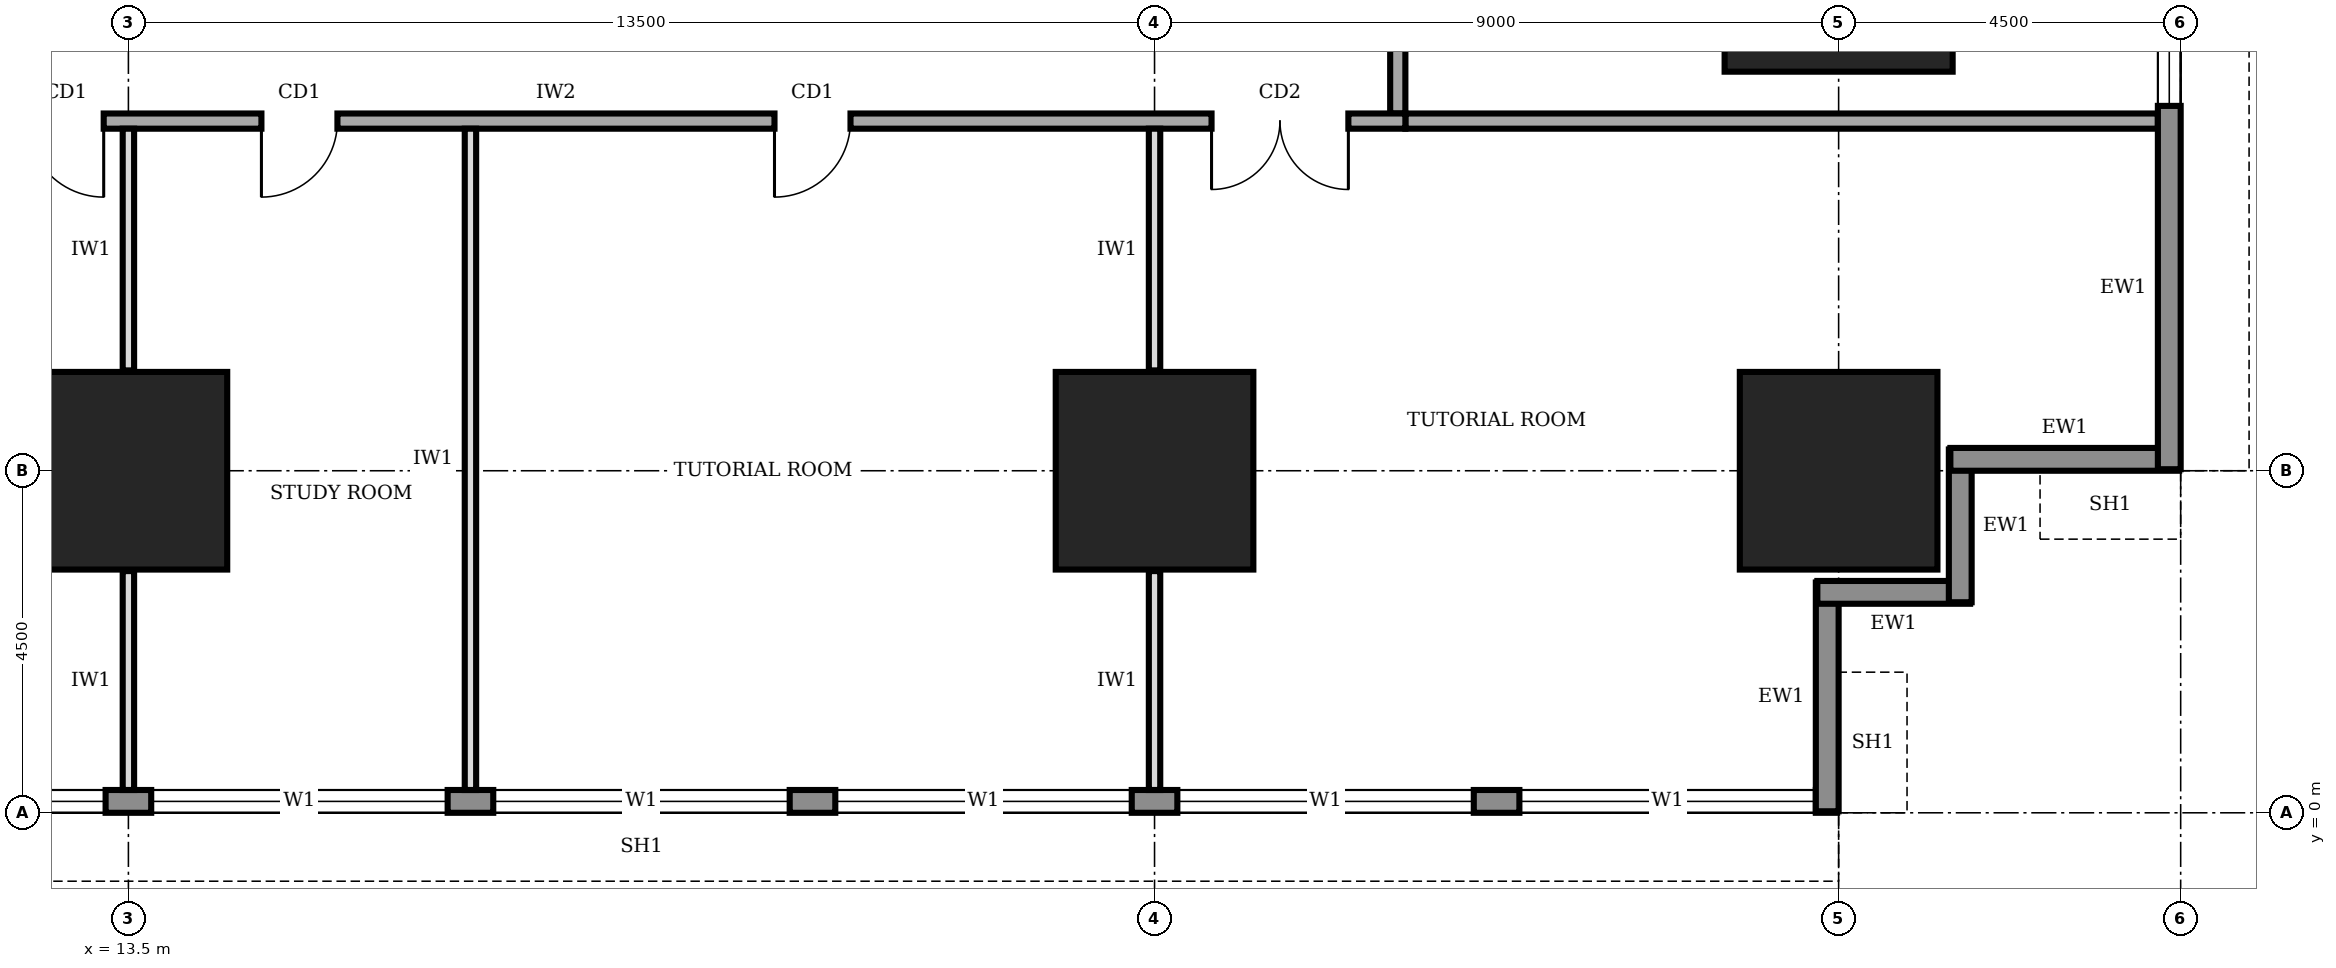
"""IFC4 building model, lengths in metres.
Left out: names, types, materials, properties, quantities, classifications, styles, units other than length and angle.
Written with IfcOpenShell. Run it as: python <this file> out.ifc"""

import sys

from ifc_helpers import new_model, si_unit, direction, frame, frame_2d, origin, origin_2d, place, context, subcontext, project, spatial, rectangle, extrude, element, fill, save


model = new_model("IFC4")
c1 = context("Model", 3, precision=1e-05, world=origin(), true_north=direction((0.0, 1.0)))
c2 = subcontext(c1, "Body", "Model", "MODEL_VIEW")
j1 = project(units=[si_unit("LENGTHUNIT", "METRE"), si_unit("PLANEANGLEUNIT", "RADIAN")], contexts=[c1])
p1 = place(None, origin())
s1 = spatial("IfcSite", under=j1, at=p1, CompositionType="ELEMENT")
p2 = place(p1, origin())
s2 = spatial("IfcBuilding", under=s1, at=p2, CompositionType="ELEMENT")
p3 = place(p2, frame((0.0, 0.0, 37.0)))
s3 = spatial("IfcBuildingStorey", under=s2, at=p3, CompositionType="ELEMENT", Elevation=37.0)
for number, where, z_axis, x_axis in (
    (1, (13.5, 4.5, 0.0), (0.0, 0.0, 1.0), (1.0, 0.0, 0.0)),
    (2, (27.0, 4.5, 0.0), (0.0, 0.0, 1.0), (1.0, 0.0, 0.0)),
    (3, (36.0, 4.5, 0.0), (0.0, 0.0, 1.0), (1.0, 0.0, 0.0)),
):
    element("IfcColumn", number, at=place(p3, frame(where, z_axis=z_axis, x_axis=x_axis)), inside=s3, PredefinedType="COLUMN", context=c2, shape_type="SweptSolid", body=[
        extrude(rectangle(XDim=2.6, YDim=2.6, at=origin_2d()), origin(), (0.0, 0.0, 1.0), 4.0),
    ])
p4 = place(p3, frame((36.0, 11.25, 0.0), z_axis=(0.0, 0.0, 1.0), x_axis=(1.0, 0.0, 0.0)))
e4 = element("IfcColumn", 4, at=p4, inside=s3, PredefinedType="COLUMN", context=c2, shape_type="SweptSolid", body=[
    extrude(rectangle(XDim=3.0, YDim=3.0, at=origin_2d()), origin(), (0.0, 0.0, 1.0), 4.0),
])
p5 = place(p3, frame((4.52, 0.15, 0.0), z_axis=(0.0, 0.0, 1.0), x_axis=(1.0, 0.0, 0.0)))
e5 = element("IfcWall", 5, at=p5, inside=s3, PredefinedType="STANDARD", context=c2, shape_type="SweptSolid", body=[
    extrude(rectangle(XDim=31.46, YDim=0.3, at=frame_2d((15.73, 0.0))), origin(), (0.0, 0.0, 1.0), 3.75),
])
p6 = place(p5, frame((4.78, 0.0, 0.9)))
e6 = element("IfcOpeningElement", 6, at=p6, cuts=e5, PredefinedType="OPENING", context=c2, shape_type="SweptSolid", body=[
    extrude(rectangle(XDim=3.9, YDim=2.2, at=frame_2d((1.95, 1.1))), frame((0.0, 0.16, 0.0), z_axis=(0.0, -1.0, 0.0), x_axis=(1.0, 0.0, 0.0)), (0.0, 0.0, 1.0), 0.32),
])
p7 = place(p5, frame((9.28, 0.0, 0.9)))
e7 = element("IfcOpeningElement", 7, at=p7, cuts=e5, PredefinedType="OPENING", context=c2, shape_type="SweptSolid", body=[
    extrude(rectangle(XDim=3.9, YDim=2.2, at=frame_2d((1.95, 1.1))), frame((0.0, 0.16, 0.0), z_axis=(0.0, -1.0, 0.0), x_axis=(1.0, 0.0, 0.0)), (0.0, 0.0, 1.0), 0.32),
])
p8 = place(p5, frame((13.78, 0.0, 0.9)))
e8 = element("IfcOpeningElement", 8, at=p8, cuts=e5, PredefinedType="OPENING", context=c2, shape_type="SweptSolid", body=[
    extrude(rectangle(XDim=3.9, YDim=2.2, at=frame_2d((1.95, 1.1))), frame((0.0, 0.16, 0.0), z_axis=(0.0, -1.0, 0.0), x_axis=(1.0, 0.0, 0.0)), (0.0, 0.0, 1.0), 0.32),
])
p9 = place(p5, frame((18.28, 0.0, 0.9)))
e9 = element("IfcOpeningElement", 9, at=p9, cuts=e5, PredefinedType="OPENING", context=c2, shape_type="SweptSolid", body=[
    extrude(rectangle(XDim=3.9, YDim=2.2, at=frame_2d((1.95, 1.1))), frame((0.0, 0.16, 0.0), z_axis=(0.0, -1.0, 0.0), x_axis=(1.0, 0.0, 0.0)), (0.0, 0.0, 1.0), 0.32),
])
p10 = place(p5, frame((22.78, 0.0, 0.9)))
e10 = element("IfcOpeningElement", 10, at=p10, cuts=e5, PredefinedType="OPENING", context=c2, shape_type="SweptSolid", body=[
    extrude(rectangle(XDim=3.9, YDim=2.2, at=frame_2d((1.95, 1.1))), frame((0.0, 0.16, 0.0), z_axis=(0.0, -1.0, 0.0), x_axis=(1.0, 0.0, 0.0)), (0.0, 0.0, 1.0), 0.32),
])
p11 = place(p5, frame((27.28, 0.0, 0.9)))
e11 = element("IfcOpeningElement", 11, at=p11, cuts=e5, PredefinedType="OPENING", context=c2, shape_type="SweptSolid", body=[
    extrude(rectangle(XDim=3.9, YDim=2.2, at=frame_2d((1.95, 1.1))), frame((0.0, 0.16, 0.0), z_axis=(0.0, -1.0, 0.0), x_axis=(1.0, 0.0, 0.0)), (0.0, 0.0, 1.0), 0.32),
])
p12 = place(p3, frame((35.85, 0.02, 0.0), z_axis=(0.0, 0.0, 1.0), x_axis=(0.0, 1.0, 0.0)))
e12 = element("IfcWall", 12, at=p12, inside=s3, PredefinedType="STANDARD", context=c2, shape_type="SweptSolid", body=[
    extrude(rectangle(XDim=3.01, YDim=0.3, at=frame_2d((1.505, 0.0))), origin(), (0.0, 0.0, 1.0), 2.85),
])
for number, where, z_axis, x_axis in (
    (13, (35.72, 2.9, 0.0), (0.0, 0.0, 1.0), (1.0, 0.0, 0.0)),
    (14, (37.6, 2.77, 0.0), (0.0, 0.0, 1.0), (0.0, 1.0, 0.0)),
):
    element("IfcWall", number, at=place(p3, frame(where, z_axis=z_axis, x_axis=x_axis)), inside=s3, PredefinedType="STANDARD", context=c2, shape_type="SweptSolid", body=[
        extrude(rectangle(XDim=2.01, YDim=0.3, at=frame_2d((1.005, 0.0))), origin(), (0.0, 0.0, 1.0), 3.75),
    ])
p13 = place(p3, frame((37.47, 4.65, 0.0), z_axis=(0.0, 0.0, 1.0), x_axis=(1.0, 0.0, 0.0)))
e15 = element("IfcWall", 15, at=p13, inside=s3, PredefinedType="STANDARD", context=c2, shape_type="SweptSolid", body=[
    extrude(rectangle(XDim=3.01, YDim=0.3, at=frame_2d((1.505, 0.0))), origin(), (0.0, 0.0, 1.0), 2.85),
])
p14 = place(p3, frame((40.35, 4.52, 0.0), z_axis=(0.0, 0.0, 1.0), x_axis=(0.0, 1.0, 0.0)))
e16 = element("IfcWall", 16, at=p14, inside=s3, PredefinedType="STANDARD", context=c2, shape_type="SweptSolid", body=[
    extrude(rectangle(XDim=31.46, YDim=0.3, at=frame_2d((15.73, 0.0))), origin(), (0.0, 0.0, 1.0), 3.75),
])
p15 = place(p14, frame((4.78, 0.0, 0.9)))
e17 = element("IfcOpeningElement", 17, at=p15, cuts=e16, PredefinedType="OPENING", context=c2, shape_type="SweptSolid", body=[
    extrude(rectangle(XDim=3.9, YDim=2.2, at=frame_2d((1.95, 1.1))), frame((0.0, 0.16, 0.0), z_axis=(0.0, -1.0, 0.0), x_axis=(1.0, 0.0, 0.0)), (0.0, 0.0, 1.0), 0.32),
])
p16 = place(p14, frame((9.28, 0.0, 0.9)))
e18 = element("IfcOpeningElement", 18, at=p16, cuts=e16, PredefinedType="OPENING", context=c2, shape_type="SweptSolid", body=[
    extrude(rectangle(XDim=3.9, YDim=2.2, at=frame_2d((1.95, 1.1))), frame((0.0, 0.16, 0.0), z_axis=(0.0, -1.0, 0.0), x_axis=(1.0, 0.0, 0.0)), (0.0, 0.0, 1.0), 0.32),
])
p17 = place(p14, frame((13.78, 0.0, 0.9)))
e19 = element("IfcOpeningElement", 19, at=p17, cuts=e16, PredefinedType="OPENING", context=c2, shape_type="SweptSolid", body=[
    extrude(rectangle(XDim=3.9, YDim=2.2, at=frame_2d((1.95, 1.1))), frame((0.0, 0.16, 0.0), z_axis=(0.0, -1.0, 0.0), x_axis=(1.0, 0.0, 0.0)), (0.0, 0.0, 1.0), 0.32),
])
p18 = place(p14, frame((18.28, 0.0, 0.9)))
e20 = element("IfcOpeningElement", 20, at=p18, cuts=e16, PredefinedType="OPENING", context=c2, shape_type="SweptSolid", body=[
    extrude(rectangle(XDim=3.9, YDim=2.2, at=frame_2d((1.95, 1.1))), frame((0.0, 0.16, 0.0), z_axis=(0.0, -1.0, 0.0), x_axis=(1.0, 0.0, 0.0)), (0.0, 0.0, 1.0), 0.32),
])
p19 = place(p14, frame((22.78, 0.0, 0.9)))
e21 = element("IfcOpeningElement", 21, at=p19, cuts=e16, PredefinedType="OPENING", context=c2, shape_type="SweptSolid", body=[
    extrude(rectangle(XDim=3.9, YDim=2.2, at=frame_2d((1.95, 1.1))), frame((0.0, 0.16, 0.0), z_axis=(0.0, -1.0, 0.0), x_axis=(1.0, 0.0, 0.0)), (0.0, 0.0, 1.0), 0.32),
])
p20 = place(p14, frame((27.28, 0.0, 0.9)))
e22 = element("IfcOpeningElement", 22, at=p20, cuts=e16, PredefinedType="OPENING", context=c2, shape_type="SweptSolid", body=[
    extrude(rectangle(XDim=3.9, YDim=2.2, at=frame_2d((1.95, 1.1))), frame((0.0, 0.16, 0.0), z_axis=(0.0, -1.0, 0.0), x_axis=(1.0, 0.0, 0.0)), (0.0, 0.0, 1.0), 0.32),
])
p21 = place(p3, frame((11.9, 9.1, 0.0), z_axis=(0.0, 0.0, 1.0), x_axis=(1.0, 0.0, 0.0)))
e23 = element("IfcWall", 23, at=p21, inside=s3, PredefinedType="SOLIDWALL", context=c2, shape_type="SweptSolid", body=[
    extrude(rectangle(XDim=18.4, YDim=0.2, at=frame_2d((9.2, 0.0))), origin(), (0.0, 0.0, 1.0), 3.75),
])
p22 = place(p21, frame((0.275, 0.0, 0.0)))
e24 = element("IfcOpeningElement", 24, at=p22, cuts=e23, PredefinedType="OPENING", context=c2, shape_type="SweptSolid", body=[
    extrude(rectangle(XDim=1.0, YDim=2.1, at=frame_2d((0.5, 1.05))), frame((0.0, 0.11, 0.0), z_axis=(0.0, -1.0, 0.0), x_axis=(1.0, 0.0, 0.0)), (0.0, 0.0, 1.0), 0.22),
])
p23 = place(p21, frame((3.35, 0.0, 0.0)))
e25 = element("IfcOpeningElement", 25, at=p23, cuts=e23, PredefinedType="OPENING", context=c2, shape_type="SweptSolid", body=[
    extrude(rectangle(XDim=1.0, YDim=2.1, at=frame_2d((0.5, 1.05))), frame((0.0, 0.11, 0.0), z_axis=(0.0, -1.0, 0.0), x_axis=(1.0, 0.0, 0.0)), (0.0, 0.0, 1.0), 0.22),
])
p24 = place(p21, frame((10.1, 0.0, 0.0)))
e26 = element("IfcOpeningElement", 26, at=p24, cuts=e23, PredefinedType="OPENING", context=c2, shape_type="SweptSolid", body=[
    extrude(rectangle(XDim=1.0, YDim=2.1, at=frame_2d((0.5, 1.05))), frame((0.0, 0.11, 0.0), z_axis=(0.0, -1.0, 0.0), x_axis=(1.0, 0.0, 0.0)), (0.0, 0.0, 1.0), 0.22),
])
p25 = place(p21, frame((15.85, 0.0, 0.0)))
e27 = element("IfcOpeningElement", 27, at=p25, cuts=e23, PredefinedType="OPENING", context=c2, shape_type="SweptSolid", body=[
    extrude(rectangle(XDim=1.8, YDim=2.1, at=frame_2d((0.9, 1.05))), frame((0.0, 0.11, 0.0), z_axis=(0.0, -1.0, 0.0), x_axis=(1.0, 0.0, 0.0)), (0.0, 0.0, 1.0), 0.22),
])
p26 = place(p3, frame((30.2, 9.2, 0.0), z_axis=(0.0, 0.0, 1.0), x_axis=(0.0, 1.0, 0.0)))
e28 = element("IfcWall", 28, at=p26, inside=s3, PredefinedType="SOLIDWALL", context=c2, shape_type="SweptSolid", body=[
    extrude(rectangle(XDim=22.3, YDim=0.2, at=frame_2d((11.15, 0.0))), origin(), (0.0, 0.0, 1.0), 3.75),
])
p27 = place(p26, frame((1.55, 0.0, 0.0)))
e29 = element("IfcOpeningElement", 29, at=p27, cuts=e28, PredefinedType="OPENING", context=c2, shape_type="SweptSolid", body=[
    extrude(rectangle(XDim=1.0, YDim=2.1, at=frame_2d((0.5, 1.05))), frame((0.0, 0.11, 0.0), z_axis=(0.0, -1.0, 0.0), x_axis=(1.0, 0.0, 0.0)), (0.0, 0.0, 1.0), 0.22),
])
p28 = place(p26, frame((8.3, 0.0, 0.0)))
e30 = element("IfcOpeningElement", 30, at=p28, cuts=e28, PredefinedType="OPENING", context=c2, shape_type="SweptSolid", body=[
    extrude(rectangle(XDim=1.0, YDim=2.1, at=frame_2d((0.5, 1.05))), frame((0.0, 0.11, 0.0), z_axis=(0.0, -1.0, 0.0), x_axis=(1.0, 0.0, 0.0)), (0.0, 0.0, 1.0), 0.22),
])
p29 = place(p26, frame((17.3, 0.0, 0.0)))
e31 = element("IfcOpeningElement", 31, at=p29, cuts=e28, PredefinedType="OPENING", context=c2, shape_type="SweptSolid", body=[
    extrude(rectangle(XDim=1.0, YDim=2.1, at=frame_2d((0.5, 1.05))), frame((0.0, 0.11, 0.0), z_axis=(0.0, -1.0, 0.0), x_axis=(1.0, 0.0, 0.0)), (0.0, 0.0, 1.0), 0.22),
])
p30 = place(p3, frame((30.3, 9.1, 0.0), z_axis=(0.0, 0.0, 1.0), x_axis=(1.0, 0.0, 0.0)))
e32 = element("IfcWall", 32, at=p30, inside=s3, PredefinedType="SOLIDWALL", context=c2, shape_type="SweptSolid", body=[
    extrude(rectangle(XDim=9.9, YDim=0.2, at=frame_2d((4.95, 0.0))), origin(), (0.0, 0.0, 1.0), 3.75),
])
p31 = place(p3, frame((13.5, 0.3, 0.0), z_axis=(0.0, 0.0, 1.0), x_axis=(0.0, 1.0, 0.0)))
e33 = element("IfcWall", 33, at=p31, inside=s3, PredefinedType="PARTITIONING", context=c2, shape_type="SweptSolid", body=[
    extrude(rectangle(XDim=2.88, YDim=0.15, at=frame_2d((1.44, 0.0))), origin(), (0.0, 0.0, 1.0), 2.85),
])
p32 = place(p3, frame((13.5, 5.82, 0.0), z_axis=(0.0, 0.0, 1.0), x_axis=(0.0, 1.0, 0.0)))
e34 = element("IfcWall", 34, at=p32, inside=s3, PredefinedType="PARTITIONING", context=c2, shape_type="SweptSolid", body=[
    extrude(rectangle(XDim=3.18, YDim=0.15, at=frame_2d((1.59, 0.0))), origin(), (0.0, 0.0, 1.0), 2.85),
])
p33 = place(p3, frame((18.0, 0.3, 0.0), z_axis=(0.0, 0.0, 1.0), x_axis=(0.0, 1.0, 0.0)))
e35 = element("IfcWall", 35, at=p33, inside=s3, PredefinedType="PARTITIONING", context=c2, shape_type="SweptSolid", body=[
    extrude(rectangle(XDim=8.7, YDim=0.15, at=frame_2d((4.35, 0.0))), origin(), (0.0, 0.0, 1.0), 3.75),
])
p34 = place(p3, frame((27.0, 0.3, 0.0), z_axis=(0.0, 0.0, 1.0), x_axis=(0.0, 1.0, 0.0)))
e36 = element("IfcWall", 36, at=p34, inside=s3, PredefinedType="PARTITIONING", context=c2, shape_type="SweptSolid", body=[
    extrude(rectangle(XDim=2.88, YDim=0.15, at=frame_2d((1.44, 0.0))), origin(), (0.0, 0.0, 1.0), 2.85),
])
p35 = place(p3, frame((27.0, 5.82, 0.0), z_axis=(0.0, 0.0, 1.0), x_axis=(0.0, 1.0, 0.0)))
e37 = element("IfcWall", 37, at=p35, inside=s3, PredefinedType="PARTITIONING", context=c2, shape_type="SweptSolid", body=[
    extrude(rectangle(XDim=3.18, YDim=0.15, at=frame_2d((1.59, 0.0))), origin(), (0.0, 0.0, 1.0), 2.85),
])
p36 = place(p6, origin())
e38 = element("IfcWindow", 38, at=p36, inside=s3, PartitioningType="SINGLE_PANEL", PredefinedType="WINDOW", context=c2, shape_type="SweptSolid", body=[
    extrude(rectangle(XDim=3.9, YDim=2.2, at=frame_2d((1.95, 1.1))), frame((0.0, 0.03, 0.0), z_axis=(0.0, -1.0, 0.0), x_axis=(1.0, 0.0, 0.0)), (0.0, 0.0, 1.0), 0.06),
])
fill(e6, e38)
p37 = place(p7, origin())
e39 = element("IfcWindow", 39, at=p37, inside=s3, PartitioningType="SINGLE_PANEL", PredefinedType="WINDOW", context=c2, shape_type="SweptSolid", body=[
    extrude(rectangle(XDim=3.9, YDim=2.2, at=frame_2d((1.95, 1.1))), frame((0.0, 0.03, 0.0), z_axis=(0.0, -1.0, 0.0), x_axis=(1.0, 0.0, 0.0)), (0.0, 0.0, 1.0), 0.06),
])
fill(e7, e39)
p38 = place(p8, origin())
e40 = element("IfcWindow", 40, at=p38, inside=s3, PartitioningType="SINGLE_PANEL", PredefinedType="WINDOW", context=c2, shape_type="SweptSolid", body=[
    extrude(rectangle(XDim=3.9, YDim=2.2, at=frame_2d((1.95, 1.1))), frame((0.0, 0.03, 0.0), z_axis=(0.0, -1.0, 0.0), x_axis=(1.0, 0.0, 0.0)), (0.0, 0.0, 1.0), 0.06),
])
fill(e8, e40)
p39 = place(p9, origin())
e41 = element("IfcWindow", 41, at=p39, inside=s3, PartitioningType="SINGLE_PANEL", PredefinedType="WINDOW", context=c2, shape_type="SweptSolid", body=[
    extrude(rectangle(XDim=3.9, YDim=2.2, at=frame_2d((1.95, 1.1))), frame((0.0, 0.03, 0.0), z_axis=(0.0, -1.0, 0.0), x_axis=(1.0, 0.0, 0.0)), (0.0, 0.0, 1.0), 0.06),
])
fill(e9, e41)
p40 = place(p10, origin())
e42 = element("IfcWindow", 42, at=p40, inside=s3, PartitioningType="SINGLE_PANEL", PredefinedType="WINDOW", context=c2, shape_type="SweptSolid", body=[
    extrude(rectangle(XDim=3.9, YDim=2.2, at=frame_2d((1.95, 1.1))), frame((0.0, 0.03, 0.0), z_axis=(0.0, -1.0, 0.0), x_axis=(1.0, 0.0, 0.0)), (0.0, 0.0, 1.0), 0.06),
])
fill(e10, e42)
p41 = place(p11, origin())
e43 = element("IfcWindow", 43, at=p41, inside=s3, PartitioningType="SINGLE_PANEL", PredefinedType="WINDOW", context=c2, shape_type="SweptSolid", body=[
    extrude(rectangle(XDim=3.9, YDim=2.2, at=frame_2d((1.95, 1.1))), frame((0.0, 0.03, 0.0), z_axis=(0.0, -1.0, 0.0), x_axis=(1.0, 0.0, 0.0)), (0.0, 0.0, 1.0), 0.06),
])
fill(e11, e43)
p42 = place(p15, origin())
e44 = element("IfcWindow", 44, at=p42, inside=s3, PartitioningType="SINGLE_PANEL", PredefinedType="WINDOW", context=c2, shape_type="SweptSolid", body=[
    extrude(rectangle(XDim=3.9, YDim=2.2, at=frame_2d((1.95, 1.1))), frame((0.0, 0.03, 0.0), z_axis=(0.0, -1.0, 0.0), x_axis=(1.0, 0.0, 0.0)), (0.0, 0.0, 1.0), 0.06),
])
fill(e17, e44)
p43 = place(p22, frame((1.0, 0.0, 0.0), z_axis=(0.0, 0.0, 1.0), x_axis=(-1.0, 0.0, 0.0)))
e45 = element("IfcDoor", 45, at=p43, inside=s3, OperationType="SINGLE_SWING_LEFT", PredefinedType="DOOR", context=c2, shape_type="SweptSolid", body=[
    extrude(rectangle(XDim=1.0, YDim=2.1, at=frame_2d((0.5, 1.05))), frame((0.0, 0.025, 0.0), z_axis=(0.0, -1.0, 0.0), x_axis=(1.0, 0.0, 0.0)), (0.0, 0.0, 1.0), 0.05),
])
fill(e24, e45)
p44 = place(p23, frame((1.0, 0.0, 0.0), z_axis=(0.0, 0.0, 1.0), x_axis=(-1.0, 0.0, 0.0)))
e46 = element("IfcDoor", 46, at=p44, inside=s3, OperationType="SINGLE_SWING_RIGHT", PredefinedType="DOOR", context=c2, shape_type="SweptSolid", body=[
    extrude(rectangle(XDim=1.0, YDim=2.1, at=frame_2d((0.5, 1.05))), frame((0.0, 0.025, 0.0), z_axis=(0.0, -1.0, 0.0), x_axis=(1.0, 0.0, 0.0)), (0.0, 0.0, 1.0), 0.05),
])
fill(e25, e46)
p45 = place(p24, frame((1.0, 0.0, 0.0), z_axis=(0.0, 0.0, 1.0), x_axis=(-1.0, 0.0, 0.0)))
e47 = element("IfcDoor", 47, at=p45, inside=s3, OperationType="SINGLE_SWING_RIGHT", PredefinedType="DOOR", context=c2, shape_type="SweptSolid", body=[
    extrude(rectangle(XDim=1.0, YDim=2.1, at=frame_2d((0.5, 1.05))), frame((0.0, 0.025, 0.0), z_axis=(0.0, -1.0, 0.0), x_axis=(1.0, 0.0, 0.0)), (0.0, 0.0, 1.0), 0.05),
])
fill(e26, e47)
p46 = place(p25, frame((1.8, 0.0, 0.0), z_axis=(0.0, 0.0, 1.0), x_axis=(-1.0, 0.0, 0.0)))
e48 = element("IfcDoor", 48, at=p46, inside=s3, OperationType="DOUBLE_DOOR_SINGLE_SWING", PredefinedType="DOOR", context=c2, shape_type="SweptSolid", body=[
    extrude(rectangle(XDim=1.8, YDim=2.1, at=frame_2d((0.9, 1.05))), frame((0.0, 0.025, 0.0), z_axis=(0.0, -1.0, 0.0), x_axis=(1.0, 0.0, 0.0)), (0.0, 0.0, 1.0), 0.05),
])
fill(e27, e48)
save(model, sys.argv[1])
